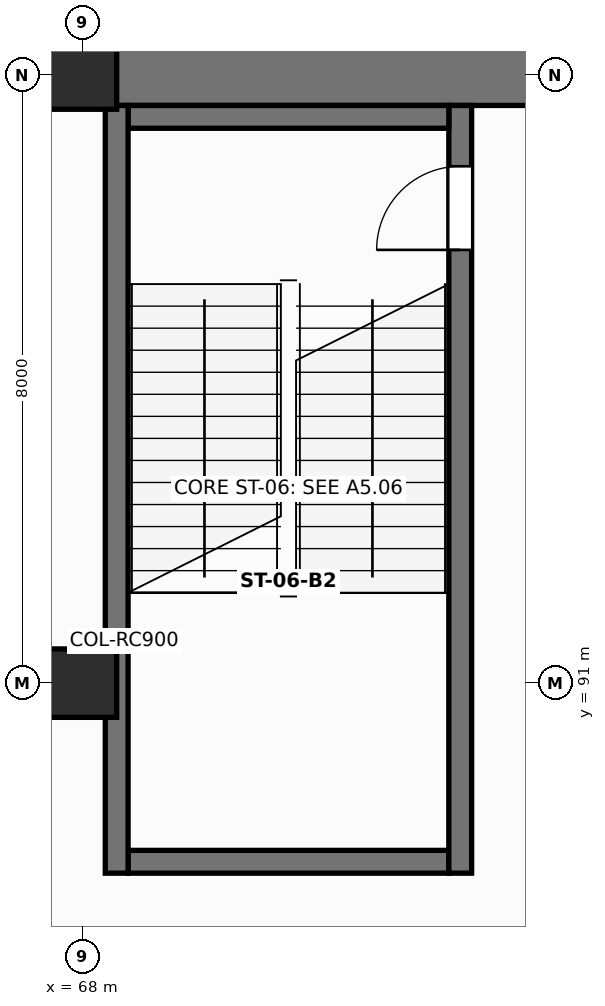
"""IFC4 building model, lengths in metres.
Left out: names, types, materials, properties, quantities, classifications, styles, units other than length and angle.
Written with IfcOpenShell. Run it as: python <this file> out.ifc"""

import sys

from ifc_helpers import new_model, si_unit, direction, frame, frame_2d, origin, origin_2d, place, context, subcontext, project, spatial, rectangle, extrude, element, fill, save


model = new_model("IFC4")
c1 = context("Model", 3, precision=1e-05, world=origin(), true_north=direction((0.0, 1.0)))
c2 = subcontext(c1, "Body", "Model", "MODEL_VIEW")
j1 = project(units=[si_unit("LENGTHUNIT", "METRE"), si_unit("PLANEANGLEUNIT", "RADIAN")], contexts=[c1])
p1 = place(None, origin())
s1 = spatial("IfcSite", under=j1, at=p1, CompositionType="ELEMENT")
p2 = place(p1, origin())
s2 = spatial("IfcBuilding", under=s1, at=p2, CompositionType="ELEMENT")
p3 = place(p2, frame((0.0, 0.0, -11.2)))
s3 = spatial("IfcBuildingStorey", under=s2, at=p3, CompositionType="ELEMENT", Elevation=-11.2)
p4 = place(p3, frame((44.4, 99.0, 0.0), z_axis=(0.0, 0.0, 1.0), x_axis=(1.0, 0.0, 0.0)))
e1 = element("IfcWall", 1, at=p4, inside=s3, PredefinedType="SOLIDWALL", context=c2, shape_type="SweptSolid", body=[
    extrude(rectangle(XDim=55.2, YDim=0.8, at=frame_2d((27.6, 0.0))), origin(), (0.0, 0.0, 1.0), 5.22),
])
for number, where, z_axis, x_axis in (
    (2, (68.0, 91.0, 0.0), (0.0, 0.0, 1.0), (1.0, 0.0, 0.0)),
    (3, (68.0, 99.0, 0.0), (0.0, 0.0, 1.0), (1.0, 0.0, 0.0)),
):
    element("IfcColumn", number, at=place(p3, frame(where, z_axis=z_axis, x_axis=x_axis)), inside=s3, PredefinedType="COLUMN", context=c2, shape_type="SweptSolid", body=[
        extrude(rectangle(XDim=0.9, YDim=0.9, at=origin_2d()), origin(), (0.0, 0.0, 1.0), 5.6),
    ])
p5 = place(p3, frame((68.6, 88.65, 0.0), z_axis=(0.0, 0.0, 1.0), x_axis=(1.0, 0.0, 0.0)))
e4 = element("IfcWall", 4, at=p5, inside=s3, PredefinedType="SHEAR", context=c2, shape_type="SweptSolid", body=[
    extrude(rectangle(XDim=4.22, YDim=0.3, at=frame_2d((2.11, 0.0))), origin(), (0.0, 0.0, 1.0), 5.235),
])
p6 = place(p3, frame((72.97, 88.5, 0.0), z_axis=(0.0, 0.0, 1.0), x_axis=(0.0, 1.0, 0.0)))
e5 = element("IfcWall", 5, at=p6, inside=s3, PredefinedType="SHEAR", context=c2, shape_type="SweptSolid", body=[
    extrude(rectangle(XDim=10.1, YDim=0.3, at=frame_2d((5.05, 0.0))), origin(), (0.0, 0.0, 1.0), 5.235),
])
p7 = place(p6, frame((8.2, 0.0, 0.0)))
e6 = element("IfcOpeningElement", 6, at=p7, cuts=e5, PredefinedType="OPENING", context=c2, shape_type="SweptSolid", body=[
    extrude(rectangle(XDim=1.1, YDim=2.15, at=frame_2d((0.55, 1.075))), frame((0.0, 0.16, 0.0), z_axis=(0.0, -1.0, 0.0), x_axis=(1.0, 0.0, 0.0)), (0.0, 0.0, 1.0), 0.32),
])
p8 = place(p3, frame((72.82, 98.45, 0.0), z_axis=(0.0, 0.0, 1.0), x_axis=(-1.0, 0.0, 0.0)))
e7 = element("IfcWall", 7, at=p8, inside=s3, PredefinedType="SHEAR", context=c2, shape_type="SweptSolid", body=[
    extrude(rectangle(XDim=4.22, YDim=0.3, at=frame_2d((2.11, 0.0))), origin(), (0.0, 0.0, 1.0), 5.235),
])
p9 = place(p3, frame((68.45, 98.6, 0.0), z_axis=(0.0, 0.0, 1.0), x_axis=(0.0, -1.0, 0.0)))
e8 = element("IfcWall", 8, at=p9, inside=s3, PredefinedType="SHEAR", context=c2, shape_type="SweptSolid", body=[
    extrude(rectangle(XDim=10.1, YDim=0.3, at=frame_2d((5.05, 0.0))), origin(), (0.0, 0.0, 1.0), 5.235),
])
p10 = place(p7, origin())
e9 = element("IfcDoor", 9, at=p10, inside=s3, OperationType="SINGLE_SWING_LEFT", PredefinedType="DOOR", context=c2, shape_type="SweptSolid", body=[
    extrude(rectangle(XDim=1.1, YDim=2.15, at=frame_2d((0.55, 1.075))), frame((0.0, 0.025, 0.0), z_axis=(0.0, -1.0, 0.0), x_axis=(1.0, 0.0, 0.0)), (0.0, 0.0, 1.0), 0.05),
])
fill(e6, e9)
save(model, sys.argv[1])
